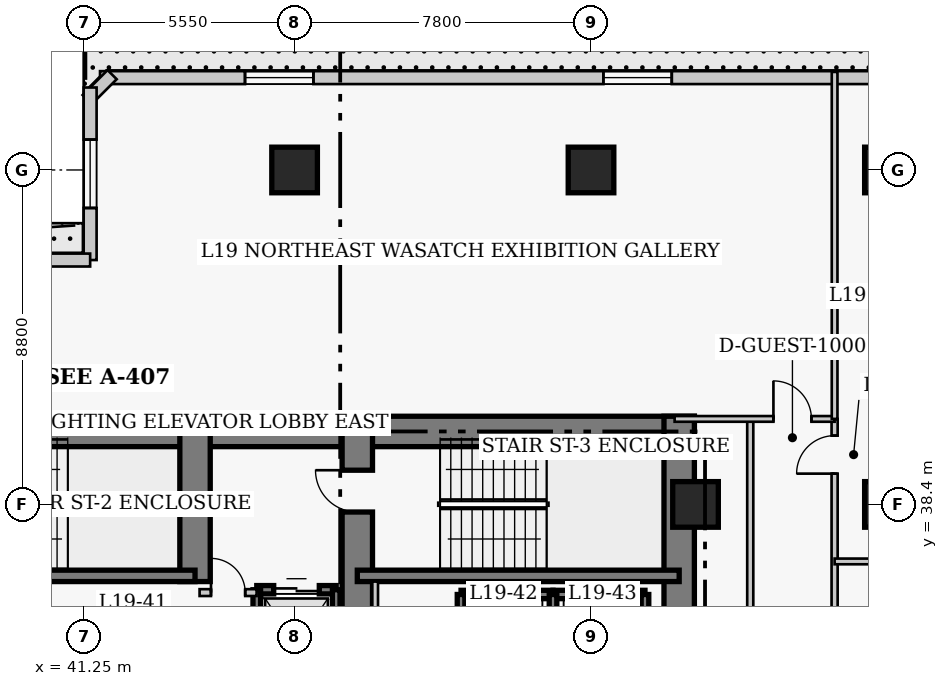
"""IFC4 building model, lengths in metres.
Left out: names, types, materials, properties, quantities, classifications, styles, units other than length and angle.
Written with IfcOpenShell. Run it as: python <this file> out.ifc"""

import sys

from ifc_helpers import new_model, si_unit, direction, frame, frame_2d, origin, origin_2d, place, context, subcontext, project, spatial, rectangle, extrude, element, fill, save


model = new_model("IFC4")
c1 = context("Model", 3, precision=1e-05, world=origin(), true_north=direction((0.0, 1.0)))
c2 = subcontext(c1, "Body", "Model", "MODEL_VIEW")
j1 = project(units=[si_unit("LENGTHUNIT", "METRE"), si_unit("PLANEANGLEUNIT", "RADIAN")], contexts=[c1])
p1 = place(None, origin())
s1 = spatial("IfcSite", under=j1, at=p1, CompositionType="ELEMENT")
p2 = place(p1, origin())
s2 = spatial("IfcBuilding", under=s1, at=p2, CompositionType="ELEMENT")
p3 = place(p2, frame((0.0, 0.0, 80.4)))
s3 = spatial("IfcBuildingStorey", under=s2, at=p3, CompositionType="ELEMENT", Elevation=80.4)
p4 = place(p3, frame((35.85, 40.32, 0.0), z_axis=(0.0, 0.0, 1.0), x_axis=(1.0, 0.0, 0.0)))
e1 = element("IfcWall", 1, at=p4, inside=s3, PredefinedType="SHEAR", context=c2, shape_type="SweptSolid", body=[
    extrude(rectangle(XDim=12.6, YDim=0.8, at=frame_2d((6.3, 0.0))), origin(), (0.0, 0.0, 1.0), 3.8),
])
p5 = place(p3, frame((48.45, 40.32, 0.0), z_axis=(0.0, 0.0, 1.0), x_axis=(1.0, 0.0, 0.0)))
e2 = element("IfcWall", 2, at=p5, inside=s3, PredefinedType="SHEAR", context=c2, shape_type="SweptSolid", body=[
    extrude(rectangle(XDim=8.87, YDim=0.8, at=frame_2d((4.435, 0.0))), origin(), (0.0, 0.0, 1.0), 3.8),
])
p6 = place(p3, frame((56.92, 27.05, 0.0), z_axis=(0.0, 0.0, 1.0), x_axis=(0.0, 1.0, 0.0)))
e3 = element("IfcWall", 3, at=p6, inside=s3, PredefinedType="SHEAR", context=c2, shape_type="SweptSolid", body=[
    extrude(rectangle(XDim=13.67, YDim=0.8, at=frame_2d((6.835, 0.0))), origin(), (0.0, 0.0, 1.0), 3.8),
])
p7 = place(p3, frame((44.18, 36.37, 0.0), z_axis=(0.0, 0.0, 1.0), x_axis=(0.0, 1.0, 0.0)))
e4 = element("IfcWall", 4, at=p7, inside=s3, PredefinedType="SHEAR", context=c2, shape_type="SweptSolid", body=[
    extrude(rectangle(XDim=3.95, YDim=0.8, at=frame_2d((1.975, 0.0))), origin(), (0.0, 0.0, 1.0), 3.8),
])
p8 = place(p3, frame((48.45, 32.35, 0.0), z_axis=(0.0, 0.0, 1.0), x_axis=(0.0, 1.0, 0.0)))
e5 = element("IfcWall", 5, at=p8, inside=s3, PredefinedType="SHEAR", context=c2, shape_type="SweptSolid", body=[
    extrude(rectangle(XDim=7.97, YDim=0.8, at=frame_2d((3.985, 0.0))), origin(), (0.0, 0.0, 1.0), 3.8),
])
p9 = place(p8, frame((5.85, 0.0, 0.0)))
e6 = element("IfcOpeningElement", 6, at=p9, cuts=e5, PredefinedType="OPENING", context=c2, shape_type="SweptSolid", body=[
    extrude(rectangle(XDim=1.1, YDim=2.15, at=frame_2d((0.55, 1.075))), frame((0.0, 0.41, 0.0), z_axis=(0.0, -1.0, 0.0), x_axis=(1.0, 0.0, 0.0)), (0.0, 0.0, 1.0), 0.82),
])
p10 = place(p3, frame((35.85, 36.52, 0.0), z_axis=(0.0, 0.0, 1.0), x_axis=(1.0, 0.0, 0.0)))
e7 = element("IfcWall", 7, at=p10, inside=s3, PredefinedType="SHEAR", context=c2, shape_type="SweptSolid", body=[
    extrude(rectangle(XDim=8.33, YDim=0.3, at=frame_2d((4.165, 0.0))), origin(), (0.0, 0.0, 1.0), 3.8),
])
p11 = place(p3, frame((48.45, 36.52, 0.0), z_axis=(0.0, 0.0, 1.0), x_axis=(1.0, 0.0, 0.0)))
e8 = element("IfcWall", 8, at=p11, inside=s3, PredefinedType="SHEAR", context=c2, shape_type="SweptSolid", body=[
    extrude(rectangle(XDim=8.47, YDim=0.3, at=frame_2d((4.235, 0.0))), origin(), (0.0, 0.0, 1.0), 3.8),
])
for number, where, z_axis, x_axis in (
    (9, (46.8, 47.2, 0.0), (0.0, 0.0, 1.0), (1.0, 0.0, 0.0)),
    (10, (54.6, 47.2, 0.0), (0.0, 0.0, 1.0), (1.0, 0.0, 0.0)),
    (11, (62.4, 38.4, 0.0), (0.0, 0.0, 1.0), (1.0, 0.0, 0.0)),
    (12, (62.4, 47.2, 0.0), (0.0, 0.0, 1.0), (1.0, 0.0, 0.0)),
    (13, (57.35, 38.4, 0.0), (0.0, 0.0, 1.0), (1.0, 0.0, 0.0)),
):
    element("IfcColumn", number, at=place(p3, frame(where, z_axis=z_axis, x_axis=x_axis)), inside=s3, PredefinedType="COLUMN", context=c2, shape_type="SweptSolid", body=[
        extrude(rectangle(XDim=1.2, YDim=1.2, at=origin_2d()), origin(), (0.0, 0.0, 1.0), 3.8),
    ])
p12 = place(p3, frame((69.97, 49.63, 0.0), z_axis=(0.0, 0.0, 1.0), x_axis=(-1.0, 0.0, 0.0)))
e14 = element("IfcWall", 14, at=p12, inside=s3, PredefinedType="SOLIDWALL", context=c2, shape_type="SweptSolid", body=[
    extrude(rectangle(XDim=28.29, YDim=0.34, at=frame_2d((14.145, 0.0))), origin(), (0.0, 0.0, 1.0), 3.54),
])
p13 = place(p12, frame((3.815, 0.0, 0.85)))
e15 = element("IfcOpeningElement", 15, at=p13, cuts=e14, PredefinedType="OPENING", context=c2, shape_type="SweptSolid", body=[
    extrude(rectangle(XDim=1.8, YDim=1.8, at=frame_2d((0.9, 0.9))), frame((0.0, 0.18, 0.0), z_axis=(0.0, -1.0, 0.0), x_axis=(1.0, 0.0, 0.0)), (0.0, 0.0, 1.0), 0.36),
])
p14 = place(p12, frame((13.245, 0.0, 0.85)))
e16 = element("IfcOpeningElement", 16, at=p14, cuts=e14, PredefinedType="OPENING", context=c2, shape_type="SweptSolid", body=[
    extrude(rectangle(XDim=1.8, YDim=1.8, at=frame_2d((0.9, 0.9))), frame((0.0, 0.18, 0.0), z_axis=(0.0, -1.0, 0.0), x_axis=(1.0, 0.0, 0.0)), (0.0, 0.0, 1.0), 0.36),
])
p15 = place(p12, frame((22.675, 0.0, 0.85)))
e17 = element("IfcOpeningElement", 17, at=p15, cuts=e14, PredefinedType="OPENING", context=c2, shape_type="SweptSolid", body=[
    extrude(rectangle(XDim=1.8, YDim=1.8, at=frame_2d((0.9, 0.9))), frame((0.0, 0.18, 0.0), z_axis=(0.0, -1.0, 0.0), x_axis=(1.0, 0.0, 0.0)), (0.0, 0.0, 1.0), 0.36),
])
p16 = place(p3, frame((41.999, 49.708, 0.0), z_axis=(0.0, 0.0, 1.0), x_axis=(-0.707238225886, -0.706975312048, 0.0)))
e18 = element("IfcWall", 18, at=p16, inside=s3, PredefinedType="SOLIDWALL", context=c2, shape_type="SweptSolid", body=[
    extrude(rectangle(XDim=0.929, YDim=0.34, at=frame_2d((0.464, 0.0))), origin(), (0.0, 0.0, 1.0), 3.54),
])
p17 = place(p3, frame((41.42, 49.37, 0.0), z_axis=(0.0, 0.0, 1.0), x_axis=(0.0, -1.0, 0.0)))
e19 = element("IfcWall", 19, at=p17, inside=s3, PredefinedType="SOLIDWALL", context=c2, shape_type="SweptSolid", body=[
    extrude(rectangle(XDim=4.54, YDim=0.34, at=frame_2d((2.27, 0.0))), origin(), (0.0, 0.0, 1.0), 3.54),
])
p18 = place(p17, frame((1.37, 0.0, 0.85)))
e20 = element("IfcOpeningElement", 20, at=p18, cuts=e19, PredefinedType="OPENING", context=c2, shape_type="SweptSolid", body=[
    extrude(rectangle(XDim=1.8, YDim=1.8, at=frame_2d((0.9, 0.9))), frame((0.0, 0.18, 0.0), z_axis=(0.0, -1.0, 0.0), x_axis=(1.0, 0.0, 0.0)), (0.0, 0.0, 1.0), 0.36),
])
p19 = place(p3, frame((41.42, 44.83, 0.0), z_axis=(0.0, 0.0, 1.0), x_axis=(-1.0, 0.0, 0.0)))
e21 = element("IfcWall", 21, at=p19, inside=s3, PredefinedType="SOLIDWALL", context=c2, shape_type="SweptSolid", body=[
    extrude(rectangle(XDim=4.84, YDim=0.34, at=frame_2d((2.42, 0.0))), origin(), (0.0, 0.0, 1.0), 3.54),
])
p20 = place(p19, frame((1.52, 0.0, 0.85)))
e22 = element("IfcOpeningElement", 22, at=p20, cuts=e21, PredefinedType="OPENING", context=c2, shape_type="SweptSolid", body=[
    extrude(rectangle(XDim=1.8, YDim=1.8, at=frame_2d((0.9, 0.9))), frame((0.0, 0.18, 0.0), z_axis=(0.0, -1.0, 0.0), x_axis=(1.0, 0.0, 0.0)), (0.0, 0.0, 1.0), 0.36),
])
p21 = place(p3, frame((51.18, 36.03, 0.0), z_axis=(0.0, 0.0, 1.0), x_axis=(1.0, 0.0, 0.0)))
e23 = element("IfcWall", 23, at=p21, inside=s3, PredefinedType="SHEAR", context=c2, shape_type="SweptSolid", body=[
    extrude(rectangle(XDim=2.42, YDim=0.22, at=frame_2d((1.21, 0.0))), origin(), (0.0, 0.0, 1.0), 3.8),
])
p22 = place(p3, frame((51.18, 33.17, 0.0), z_axis=(0.0, 0.0, 1.0), x_axis=(0.0, 1.0, 0.0)))
e24 = element("IfcWall", 24, at=p22, inside=s3, PredefinedType="SHEAR", context=c2, shape_type="SweptSolid", body=[
    extrude(rectangle(XDim=2.86, YDim=0.2, at=frame_2d((1.43, 0.0))), origin(), (0.0, 0.0, 1.0), 3.8),
])
p23 = place(p3, frame((53.6, 36.03, 0.0), z_axis=(0.0, 0.0, 1.0), x_axis=(1.0, 0.0, 0.0)))
e25 = element("IfcWall", 25, at=p23, inside=s3, PredefinedType="SHEAR", context=c2, shape_type="SweptSolid", body=[
    extrude(rectangle(XDim=2.42, YDim=0.22, at=frame_2d((1.21, 0.0))), origin(), (0.0, 0.0, 1.0), 3.8),
])
for number, where, z_axis, x_axis in (
    (26, (53.6, 33.17, 0.0), (0.0, 0.0, 1.0), (0.0, 1.0, 0.0)),
    (27, (56.02, 33.17, 0.0), (0.0, 0.0, 1.0), (0.0, 1.0, 0.0)),
):
    element("IfcWall", number, at=place(p3, frame(where, z_axis=z_axis, x_axis=x_axis)), inside=s3, PredefinedType="SHEAR", context=c2, shape_type="SweptSolid", body=[
        extrude(rectangle(XDim=2.86, YDim=0.2, at=frame_2d((1.43, 0.0))), origin(), (0.0, 0.0, 1.0), 3.8),
    ])
p24 = place(p3, frame((45.805, 36.155, 0.0), z_axis=(0.0, 0.0, 1.0), x_axis=(1.0, 0.0, 0.0)))
e28 = element("IfcWall", 28, at=p24, inside=s3, PredefinedType="SHEAR", context=c2, shape_type="SweptSolid", body=[
    extrude(rectangle(XDim=2.09, YDim=0.22, at=frame_2d((1.045, 0.0))), origin(), (0.0, 0.0, 1.0), 3.8),
])
p25 = place(p24, frame((0.445, 0.0, 0.0)))
e29 = element("IfcOpeningElement", 29, at=p25, cuts=e28, PredefinedType="OPENING", context=c2, shape_type="SweptSolid", body=[
    extrude(rectangle(XDim=1.2, YDim=2.15, at=frame_2d((0.6, 1.075))), frame((0.0, 0.12, 0.0), z_axis=(0.0, -1.0, 0.0), x_axis=(1.0, 0.0, 0.0)), (0.0, 0.0, 1.0), 0.24),
])
p26 = place(p3, frame((45.805, 32.65, 0.0), z_axis=(0.0, 0.0, 1.0), x_axis=(0.0, 1.0, 0.0)))
e30 = element("IfcWall", 30, at=p26, inside=s3, PredefinedType="SHEAR", context=c2, shape_type="SweptSolid", body=[
    extrude(rectangle(XDim=3.505, YDim=0.2, at=frame_2d((1.752, 0.0))), origin(), (0.0, 0.0, 1.0), 3.8),
])
p27 = place(p3, frame((47.895, 33.245, 0.0), z_axis=(0.0, 0.0, 1.0), x_axis=(0.0, 1.0, 0.0)))
e31 = element("IfcWall", 31, at=p27, inside=s3, PredefinedType="SHEAR", context=c2, shape_type="SweptSolid", body=[
    extrude(rectangle(XDim=2.91, YDim=0.2, at=frame_2d((1.455, 0.0))), origin(), (0.0, 0.0, 1.0), 3.8),
])
p28 = place(p3, frame((44.3, 36.08, 0.0), z_axis=(0.0, 0.0, 1.0), x_axis=(1.0, 0.0, 0.0)))
e32 = element("IfcWall", 32, at=p28, inside=s3, PredefinedType="PARTITIONING", context=c2, shape_type="SweptSolid", body=[
    extrude(rectangle(XDim=1.5, YDim=0.18, at=frame_2d((0.75, 0.0))), origin(), (0.0, 0.0, 1.0), 3.54),
])
p29 = place(p28, frame((0.3, 0.0, 0.0)))
e33 = element("IfcOpeningElement", 33, at=p29, cuts=e32, PredefinedType="OPENING", context=c2, shape_type="SweptSolid", body=[
    extrude(rectangle(XDim=0.9, YDim=2.15, at=frame_2d((0.45, 1.075))), frame((0.0, 0.1, 0.0), z_axis=(0.0, -1.0, 0.0), x_axis=(1.0, 0.0, 0.0)), (0.0, 0.0, 1.0), 0.2),
])
p30 = place(p3, frame((48.92, 32.75, 0.0), z_axis=(0.0, 0.0, 1.0), x_axis=(0.0, 1.0, 0.0)))
e34 = element("IfcWall", 34, at=p30, inside=s3, PredefinedType="PARTITIONING", context=c2, shape_type="SweptSolid", body=[
    extrude(rectangle(XDim=3.62, YDim=0.15, at=frame_2d((1.81, 0.0))), origin(), (0.0, 0.0, 1.0), 3.54),
])
p31 = place(p3, frame((61.01, 11.85, 0.0), z_axis=(0.0, 0.0, 1.0), x_axis=(0.0, 1.0, 0.0)))
e35 = element("IfcWall", 35, at=p31, inside=s3, PredefinedType="PARTITIONING", context=c2, shape_type="SweptSolid", body=[
    extrude(rectangle(XDim=28.8, YDim=0.16, at=frame_2d((14.4, 0.0))), origin(), (0.0, 0.0, 1.0), 3.54),
])
p32 = place(p31, frame((3.6, 0.0, 0.0)))
e36 = element("IfcOpeningElement", 36, at=p32, cuts=e35, PredefinedType="OPENING", context=c2, shape_type="SweptSolid", body=[
    extrude(rectangle(XDim=0.95, YDim=2.1, at=frame_2d((0.475, 1.05))), frame((0.0, 0.09, 0.0), z_axis=(0.0, -1.0, 0.0), x_axis=(1.0, 0.0, 0.0)), (0.0, 0.0, 1.0), 0.18),
])
p33 = place(p31, frame((10.019, 0.0, 0.0)))
e37 = element("IfcOpeningElement", 37, at=p33, cuts=e35, PredefinedType="OPENING", context=c2, shape_type="SweptSolid", body=[
    extrude(rectangle(XDim=0.95, YDim=2.1, at=frame_2d((0.475, 1.05))), frame((0.0, 0.09, 0.0), z_axis=(0.0, -1.0, 0.0), x_axis=(1.0, 0.0, 0.0)), (0.0, 0.0, 1.0), 0.18),
])
p34 = place(p31, frame((27.36, 0.0, 0.0)))
e38 = element("IfcOpeningElement", 38, at=p34, cuts=e35, PredefinedType="OPENING", context=c2, shape_type="SweptSolid", body=[
    extrude(rectangle(XDim=1.0, YDim=2.15, at=frame_2d((0.5, 1.075))), frame((0.0, 0.09, 0.0), z_axis=(0.0, -1.0, 0.0), x_axis=(1.0, 0.0, 0.0)), (0.0, 0.0, 1.0), 0.18),
])
p35 = place(p3, frame((58.79, 26.11, 0.0), z_axis=(0.0, 0.0, 1.0), x_axis=(0.0, 1.0, 0.0)))
e39 = element("IfcWall", 39, at=p35, inside=s3, PredefinedType="PARTITIONING", context=c2, shape_type="SweptSolid", body=[
    extrude(rectangle(XDim=14.54, YDim=0.16, at=frame_2d((7.27, 0.0))), origin(), (0.0, 0.0, 1.0), 3.54),
])
p36 = place(p3, frame((56.8, 40.65, 0.0), z_axis=(0.0, 0.0, 1.0), x_axis=(1.0, 0.0, 0.0)))
e40 = element("IfcWall", 40, at=p36, inside=s3, PredefinedType="PARTITIONING", context=c2, shape_type="SweptSolid", body=[
    extrude(rectangle(XDim=4.21, YDim=0.15, at=frame_2d((2.105, 0.0))), origin(), (0.0, 0.0, 1.0), 3.54),
])
p37 = place(p36, frame((2.6, 0.0, 0.0)))
e41 = element("IfcOpeningElement", 41, at=p37, cuts=e40, PredefinedType="OPENING", context=c2, shape_type="SweptSolid", body=[
    extrude(rectangle(XDim=1.0, YDim=2.15, at=frame_2d((0.5, 1.075))), frame((0.0, 0.085, 0.0), z_axis=(0.0, -1.0, 0.0), x_axis=(1.0, 0.0, 0.0)), (0.0, 0.0, 1.0), 0.17),
])
p38 = place(p3, frame((61.01, 40.65, 0.0), z_axis=(0.0, 0.0, 1.0), x_axis=(0.0, 1.0, 0.0)))
e42 = element("IfcWall", 42, at=p38, inside=s3, PredefinedType="PARTITIONING", context=c2, shape_type="SweptSolid", body=[
    extrude(rectangle(XDim=9.13, YDim=0.15, at=frame_2d((4.565, 0.0))), origin(), (0.0, 0.0, 1.0), 3.54),
])
p39 = place(p3, frame((61.01, 36.9, 0.0), z_axis=(0.0, 0.0, 1.0), x_axis=(1.0, 0.0, 0.0)))
e43 = element("IfcWall", 43, at=p39, inside=s3, PredefinedType="PARTITIONING", context=c2, shape_type="SweptSolid", body=[
    extrude(rectangle(XDim=4.09, YDim=0.15, at=frame_2d((2.045, 0.0))), origin(), (0.0, 0.0, 1.0), 3.54),
])
p40 = place(p14, origin())
e44 = element("IfcWindow", 44, at=p40, inside=s3, PartitioningType="SINGLE_PANEL", PredefinedType="WINDOW", context=c2, shape_type="SweptSolid", body=[
    extrude(rectangle(XDim=1.8, YDim=1.8, at=frame_2d((0.9, 0.9))), frame((0.0, 0.03, 0.0), z_axis=(0.0, -1.0, 0.0), x_axis=(1.0, 0.0, 0.0)), (0.0, 0.0, 1.0), 0.06),
])
fill(e16, e44)
p41 = place(p15, origin())
e45 = element("IfcWindow", 45, at=p41, inside=s3, PartitioningType="SINGLE_PANEL", PredefinedType="WINDOW", context=c2, shape_type="SweptSolid", body=[
    extrude(rectangle(XDim=1.8, YDim=1.8, at=frame_2d((0.9, 0.9))), frame((0.0, 0.03, 0.0), z_axis=(0.0, -1.0, 0.0), x_axis=(1.0, 0.0, 0.0)), (0.0, 0.0, 1.0), 0.06),
])
fill(e17, e45)
p42 = place(p18, origin())
e46 = element("IfcWindow", 46, at=p42, inside=s3, PartitioningType="SINGLE_PANEL", PredefinedType="WINDOW", context=c2, shape_type="SweptSolid", body=[
    extrude(rectangle(XDim=1.8, YDim=1.8, at=frame_2d((0.9, 0.9))), frame((0.0, 0.03, 0.0), z_axis=(0.0, -1.0, 0.0), x_axis=(1.0, 0.0, 0.0)), (0.0, 0.0, 1.0), 0.06),
])
fill(e20, e46)
p43 = place(p25, origin())
e47 = element("IfcDoor", 47, at=p43, inside=s3, OperationType="DOUBLE_DOOR_SLIDING", PredefinedType="DOOR", context=c2, shape_type="SweptSolid", body=[
    extrude(rectangle(XDim=1.2, YDim=2.15, at=frame_2d((0.6, 1.075))), frame((0.0, 0.025, 0.0), z_axis=(0.0, -1.0, 0.0), x_axis=(1.0, 0.0, 0.0)), (0.0, 0.0, 1.0), 0.05),
])
fill(e29, e47)
p44 = place(p29, origin())
e48 = element("IfcDoor", 48, at=p44, inside=s3, OperationType="SINGLE_SWING_LEFT", PredefinedType="DOOR", context=c2, shape_type="SweptSolid", body=[
    extrude(rectangle(XDim=0.9, YDim=2.15, at=frame_2d((0.45, 1.075))), frame((0.0, 0.025, 0.0), z_axis=(0.0, -1.0, 0.0), x_axis=(1.0, 0.0, 0.0)), (0.0, 0.0, 1.0), 0.05),
])
fill(e33, e48)
p45 = place(p37, origin())
e49 = element("IfcDoor", 49, at=p45, inside=s3, OperationType="SINGLE_SWING_LEFT", PredefinedType="DOOR", context=c2, shape_type="SweptSolid", body=[
    extrude(rectangle(XDim=1.0, YDim=2.15, at=frame_2d((0.5, 1.075))), frame((0.0, 0.025, 0.0), z_axis=(0.0, -1.0, 0.0), x_axis=(1.0, 0.0, 0.0)), (0.0, 0.0, 1.0), 0.05),
])
fill(e41, e49)
p46 = place(p34, origin())
e50 = element("IfcDoor", 50, at=p46, inside=s3, OperationType="SINGLE_SWING_LEFT", PredefinedType="DOOR", context=c2, shape_type="SweptSolid", body=[
    extrude(rectangle(XDim=1.0, YDim=2.15, at=frame_2d((0.5, 1.075))), frame((0.0, 0.025, 0.0), z_axis=(0.0, -1.0, 0.0), x_axis=(1.0, 0.0, 0.0)), (0.0, 0.0, 1.0), 0.05),
])
fill(e38, e50)
p47 = place(p9, origin())
e51 = element("IfcDoor", 51, at=p47, inside=s3, OperationType="SINGLE_SWING_RIGHT", PredefinedType="DOOR", context=c2, shape_type="SweptSolid", body=[
    extrude(rectangle(XDim=1.1, YDim=2.15, at=frame_2d((0.55, 1.075))), frame((0.0, 0.025, 0.0), z_axis=(0.0, -1.0, 0.0), x_axis=(1.0, 0.0, 0.0)), (0.0, 0.0, 1.0), 0.05),
])
fill(e6, e51)
save(model, sys.argv[1])
